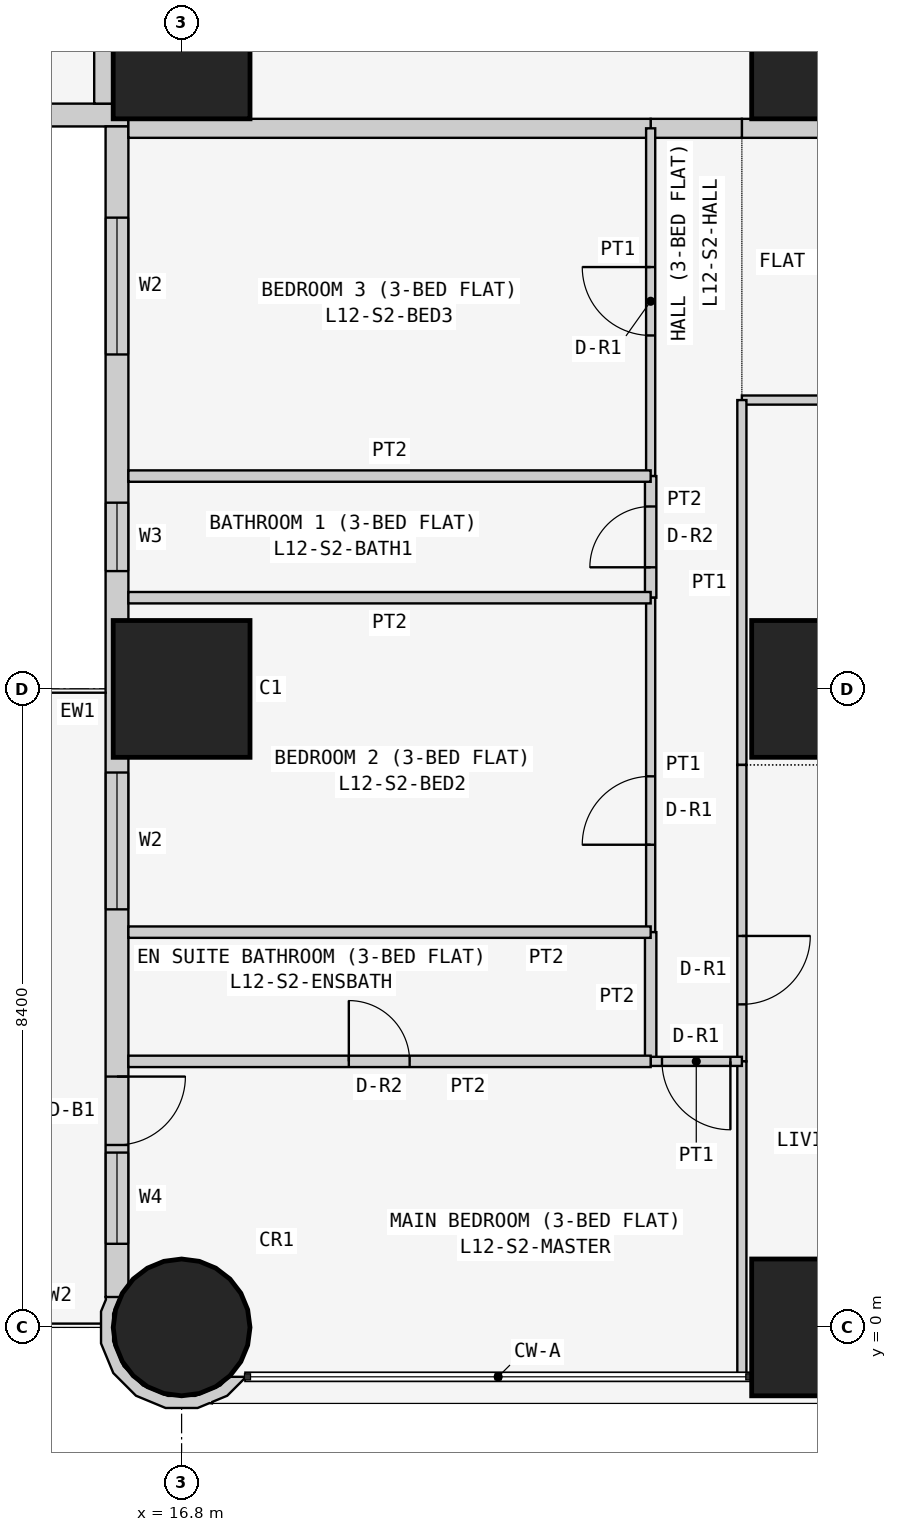
"""IFC4 building model, lengths in metres.
Left out: names, types, materials, properties, quantities, classifications, styles, units other than length and angle.
Written with IfcOpenShell. Run it as: python <this file> out.ifc"""

import sys

from ifc_helpers import new_model, si_unit, direction, frame, frame_2d, origin, origin_2d, place, context, subcontext, project, spatial, polyline, rectangle, circle, outline, extrude, element, fill, save


model = new_model("IFC4")
c1 = context("Model", 3, precision=1e-05, world=origin(), true_north=direction((0.0, 1.0)))
c2 = subcontext(c1, "Body", "Model", "MODEL_VIEW")
j1 = project(units=[si_unit("LENGTHUNIT", "METRE"), si_unit("PLANEANGLEUNIT", "RADIAN")], contexts=[c1])
p1 = place(None, origin())
s1 = spatial("IfcSite", under=j1, at=p1, CompositionType="ELEMENT")
p2 = place(p1, origin())
s2 = spatial("IfcBuilding", under=s1, at=p2, CompositionType="ELEMENT")
p3 = place(p2, frame((0.0, 0.0, 52.5)))
s3 = spatial("IfcBuildingStorey", under=s2, at=p3, CompositionType="ELEMENT", Elevation=52.5)
p4 = place(p3, frame((16.8, 0.0, 0.0), z_axis=(0.0, 0.0, 1.0), x_axis=(1.0, 0.0, 0.0)))
e1 = element("IfcColumn", 1, at=p4, inside=s3, PredefinedType="COLUMN", context=c2, shape_type="SweptSolid", body=[
    extrude(circle(Radius=0.9, at=origin_2d()), origin(), (0.0, 0.0, 1.0), 3.6),
])
for number, where, z_axis, x_axis in (
    (2, (16.8, 8.4, 0.0), (0.0, 0.0, 1.0), (1.0, 0.0, 0.0)),
    (3, (16.8, 16.8, 0.0), (0.0, 0.0, 1.0), (1.0, 0.0, 0.0)),
    (4, (25.2, 0.0, 0.0), (0.0, 0.0, 1.0), (1.0, 0.0, 0.0)),
    (5, (25.2, 8.4, 0.0), (0.0, 0.0, 1.0), (1.0, 0.0, 0.0)),
    (6, (25.2, 16.8, 0.0), (0.0, 0.0, 1.0), (1.0, 0.0, 0.0)),
):
    element("IfcColumn", number, at=place(p3, frame(where, z_axis=z_axis, x_axis=x_axis)), inside=s3, PredefinedType="COLUMN", context=c2, shape_type="SweptSolid", body=[
        extrude(rectangle(XDim=1.8, YDim=1.8, at=origin_2d()), origin(), (0.0, 0.0, 1.0), 3.6),
    ])
p5 = place(p3, frame((0.4, 15.95, 0.0), z_axis=(0.0, 0.0, 1.0), x_axis=(1.0, 0.0, 0.0)))
e7 = element("IfcWall", 7, at=p5, inside=s3, PredefinedType="SOLIDWALL", context=c2, shape_type="SweptSolid", body=[
    extrude(rectangle(XDim=15.7, YDim=0.3, at=frame_2d((7.85, 0.0))), origin(), (0.0, 0.0, 1.0), 3.45),
])
p6 = place(p5, frame((12.4, 0.0, 0.9)))
e8 = element("IfcOpeningElement", 8, at=p6, cuts=e7, PredefinedType="OPENING", context=c2, shape_type="SweptSolid", body=[
    extrude(rectangle(XDim=1.8, YDim=1.5, at=frame_2d((0.9, 0.75))), frame((0.0, 0.16, 0.0), z_axis=(0.0, -1.0, 0.0), x_axis=(1.0, 0.0, 0.0)), (0.0, 0.0, 1.0), 0.32),
])
p7 = place(p5, frame((9.55, 0.0, 1.5)))
e9 = element("IfcOpeningElement", 9, at=p7, cuts=e7, PredefinedType="OPENING", context=c2, shape_type="SweptSolid", body=[
    extrude(rectangle(XDim=0.9, YDim=0.7, at=frame_2d((0.45, 0.35))), frame((0.0, 0.16, 0.0), z_axis=(0.0, -1.0, 0.0), x_axis=(1.0, 0.0, 0.0)), (0.0, 0.0, 1.0), 0.32),
])
p8 = place(p5, frame((5.1, 0.0, 0.9)))
e10 = element("IfcOpeningElement", 10, at=p8, cuts=e7, PredefinedType="OPENING", context=c2, shape_type="SweptSolid", body=[
    extrude(rectangle(XDim=1.8, YDim=1.5, at=frame_2d((0.9, 0.75))), frame((0.0, 0.16, 0.0), z_axis=(0.0, -1.0, 0.0), x_axis=(1.0, 0.0, 0.0)), (0.0, 0.0, 1.0), 0.32),
])
p9 = place(p5, frame((2.0, 0.0, 0.0)))
e11 = element("IfcOpeningElement", 11, at=p9, cuts=e7, PredefinedType="OPENING", context=c2, shape_type="SweptSolid", body=[
    extrude(rectangle(XDim=0.9, YDim=2.4, at=frame_2d((0.45, 1.2))), frame((0.0, 0.16, 0.0), z_axis=(0.0, -1.0, 0.0), x_axis=(1.0, 0.0, 0.0)), (0.0, 0.0, 1.0), 0.32),
])
p10 = place(p5, frame((0.7, 0.0, 0.9)))
e12 = element("IfcOpeningElement", 12, at=p10, cuts=e7, PredefinedType="OPENING", context=c2, shape_type="SweptSolid", body=[
    extrude(rectangle(XDim=1.2, YDim=1.5, at=frame_2d((0.6, 0.75))), frame((0.0, 0.16, 0.0), z_axis=(0.0, -1.0, 0.0), x_axis=(1.0, 0.0, 0.0)), (0.0, 0.0, 1.0), 0.32),
])
p11 = place(p3, frame((15.95, 15.8, 0.0), z_axis=(0.0, 0.0, 1.0), x_axis=(0.0, -1.0, 0.0)))
e13 = element("IfcWall", 13, at=p11, inside=s3, PredefinedType="SOLIDWALL", context=c2, shape_type="SweptSolid", body=[
    extrude(rectangle(XDim=15.4, YDim=0.3, at=frame_2d((7.7, 0.0))), origin(), (0.0, 0.0, 1.0), 3.45),
])
p12 = place(p11, frame((1.2, 0.0, 0.9)))
e14 = element("IfcOpeningElement", 14, at=p12, cuts=e13, PredefinedType="OPENING", context=c2, shape_type="SweptSolid", body=[
    extrude(rectangle(XDim=1.8, YDim=1.5, at=frame_2d((0.9, 0.75))), frame((0.0, 0.16, 0.0), z_axis=(0.0, -1.0, 0.0), x_axis=(1.0, 0.0, 0.0)), (0.0, 0.0, 1.0), 0.32),
])
p13 = place(p11, frame((4.95, 0.0, 1.5)))
e15 = element("IfcOpeningElement", 15, at=p13, cuts=e13, PredefinedType="OPENING", context=c2, shape_type="SweptSolid", body=[
    extrude(rectangle(XDim=0.9, YDim=0.7, at=frame_2d((0.45, 0.35))), frame((0.0, 0.16, 0.0), z_axis=(0.0, -1.0, 0.0), x_axis=(1.0, 0.0, 0.0)), (0.0, 0.0, 1.0), 0.32),
])
p14 = place(p11, frame((8.5, 0.0, 0.9)))
e16 = element("IfcOpeningElement", 16, at=p14, cuts=e13, PredefinedType="OPENING", context=c2, shape_type="SweptSolid", body=[
    extrude(rectangle(XDim=1.8, YDim=1.5, at=frame_2d((0.9, 0.75))), frame((0.0, 0.16, 0.0), z_axis=(0.0, -1.0, 0.0), x_axis=(1.0, 0.0, 0.0)), (0.0, 0.0, 1.0), 0.32),
])
p15 = place(p11, frame((12.5, 0.0, 0.0)))
e17 = element("IfcOpeningElement", 17, at=p15, cuts=e13, PredefinedType="OPENING", context=c2, shape_type="SweptSolid", body=[
    extrude(rectangle(XDim=0.9, YDim=2.4, at=frame_2d((0.45, 1.2))), frame((0.0, 0.16, 0.0), z_axis=(0.0, -1.0, 0.0), x_axis=(1.0, 0.0, 0.0)), (0.0, 0.0, 1.0), 0.32),
])
p16 = place(p11, frame((13.5, 0.0, 0.9)))
e18 = element("IfcOpeningElement", 18, at=p16, cuts=e13, PredefinedType="OPENING", context=c2, shape_type="SweptSolid", body=[
    extrude(rectangle(XDim=1.2, YDim=1.5, at=frame_2d((0.6, 0.75))), frame((0.0, 0.16, 0.0), z_axis=(0.0, -1.0, 0.0), x_axis=(1.0, 0.0, 0.0)), (0.0, 0.0, 1.0), 0.32),
])
p17 = place(p3, frame((15.89, 0.364, 0.0), z_axis=(0.0, 0.0, 1.0), x_axis=(-0.377204953059, -0.926129809145, 0.0)))
e19 = element("IfcWall", 19, at=p17, inside=s3, PredefinedType="SOLIDWALL", context=c2, shape_type="SweptSolid", body=[
    extrude(outline(polyline([(0.36, 1.803), (0.509, 1.741), (0.761, 1.486), (0.896, 1.154), (0.894, 0.795), (0.755, 0.465), (0.5, 0.213), (0.168, 0.078), (-0.1, 0.08), (0.001, -0.097), (0.03, -0.08), (0.199, -0.081), (0.589, 0.078), (0.889, 0.374), (1.053, 0.763), (1.055, 1.185), (0.896, 1.575), (0.778, 1.695), (0.769, 1.728), (0.75, 1.723), (0.6, 1.875), (0.295, 2.004), (0.281, 1.998), (0.36, 1.803)])), origin(), (0.0, 0.0, 1.0), 3.45),
])
p18 = place(p3, frame((29.4, 15.775, 0.0), z_axis=(0.0, 0.0, 1.0), x_axis=(-1.0, 0.0, 0.0)))
e20 = element("IfcWall", 20, at=p18, inside=s3, PredefinedType="PARTITIONING", context=c2, shape_type="SweptSolid", body=[
    extrude(rectangle(XDim=5.229, YDim=0.25, at=frame_2d((2.615, 0.0))), origin(), (0.0, 0.0, 1.0), 3.45),
])
p19 = place(p18, frame((2.1, 0.0, 0.0)))
e21 = element("IfcOpeningElement", 21, at=p19, cuts=e20, PredefinedType="OPENING", context=c2, shape_type="SweptSolid", body=[
    extrude(rectangle(XDim=1.0, YDim=2.1, at=frame_2d((0.5, 1.05))), frame((0.0, 0.135, 0.0), z_axis=(0.0, -1.0, 0.0), x_axis=(1.0, 0.0, 0.0)), (0.0, 0.0, 1.0), 0.27),
])
p20 = place(p3, frame((24.171, 15.775, 0.0), z_axis=(0.0, 0.0, 1.0), x_axis=(-1.0, 0.0, 0.0)))
e22 = element("IfcWall", 22, at=p20, inside=s3, PredefinedType="PARTITIONING", context=c2, shape_type="SweptSolid", body=[
    extrude(rectangle(XDim=1.2, YDim=0.25, at=frame_2d((0.6, 0.0))), origin(), (0.0, 0.0, 1.0), 3.45),
])
for number, where, z_axis, x_axis in (
    (23, (22.971, 15.775, 0.0), (0.0, 0.0, 1.0), (-1.0, 0.0, 0.0)),
    (24, (15.775, 16.1, 0.0), (0.0, 0.0, 1.0), (0.0, 1.0, 0.0)),
):
    element("IfcWall", number, at=place(p3, frame(where, z_axis=z_axis, x_axis=x_axis)), inside=s3, PredefinedType="PARTITIONING", context=c2, shape_type="SweptSolid", body=[
        extrude(rectangle(XDim=6.871, YDim=0.25, at=frame_2d((3.436, 0.0))), origin(), (0.0, 0.0, 1.0), 3.45),
    ])
p21 = place(p3, frame((29.4, 12.2, 0.0), z_axis=(0.0, 0.0, 1.0), x_axis=(-1.0, 0.0, 0.0)))
e25 = element("IfcWall", 25, at=p21, inside=s3, PredefinedType="PARTITIONING", context=c2, shape_type="SweptSolid", body=[
    extrude(rectangle(XDim=5.229, YDim=0.12, at=frame_2d((2.615, 0.0))), origin(), (0.0, 0.0, 1.0), 3.45),
])
p22 = place(p21, frame((1.05, 0.0, 0.0)))
e26 = element("IfcOpeningElement", 26, at=p22, cuts=e25, PredefinedType="OPENING", context=c2, shape_type="SweptSolid", body=[
    extrude(rectangle(XDim=0.9, YDim=2.1, at=frame_2d((0.45, 1.05))), frame((0.0, 0.07, 0.0), z_axis=(0.0, -1.0, 0.0), x_axis=(1.0, 0.0, 0.0)), (0.0, 0.0, 1.0), 0.14),
])
p23 = place(p3, frame((24.171, 7.4, 0.0), z_axis=(0.0, 0.0, 1.0), x_axis=(0.0, 1.0, 0.0)))
e27 = element("IfcWall", 27, at=p23, inside=s3, PredefinedType="PARTITIONING", context=c2, shape_type="SweptSolid", body=[
    extrude(rectangle(XDim=4.8, YDim=0.12, at=frame_2d((2.4, 0.0))), origin(), (0.0, 0.0, 1.0), 3.45),
])
p24 = place(p3, frame((24.171, 3.5, 0.0), z_axis=(0.0, 0.0, 1.0), x_axis=(0.0, 1.0, 0.0)))
e28 = element("IfcWall", 28, at=p24, inside=s3, PredefinedType="PARTITIONING", context=c2, shape_type="SweptSolid", body=[
    extrude(rectangle(XDim=3.9, YDim=0.12, at=frame_2d((1.95, 0.0))), origin(), (0.0, 0.0, 1.0), 3.45),
])
p25 = place(p24, frame((0.75, 0.0, 0.0)))
e29 = element("IfcOpeningElement", 29, at=p25, cuts=e28, PredefinedType="OPENING", context=c2, shape_type="SweptSolid", body=[
    extrude(rectangle(XDim=0.9, YDim=2.1, at=frame_2d((0.45, 1.05))), frame((0.0, 0.07, 0.0), z_axis=(0.0, -1.0, 0.0), x_axis=(1.0, 0.0, 0.0)), (0.0, 0.0, 1.0), 0.14),
])
p26 = place(p3, frame((24.171, -0.65, 0.0), z_axis=(0.0, 0.0, 1.0), x_axis=(0.0, 1.0, 0.0)))
e30 = element("IfcWall", 30, at=p26, inside=s3, PredefinedType="PARTITIONING", context=c2, shape_type="SweptSolid", body=[
    extrude(rectangle(XDim=4.15, YDim=0.12, at=frame_2d((2.075, 0.0))), origin(), (0.0, 0.0, 1.0), 3.45),
])
p27 = place(p3, frame((22.971, 11.2, 0.0), z_axis=(0.0, 0.0, 1.0), x_axis=(0.0, 1.0, 0.0)))
e31 = element("IfcWall", 31, at=p27, inside=s3, PredefinedType="PARTITIONING", context=c2, shape_type="SweptSolid", body=[
    extrude(rectangle(XDim=4.575, YDim=0.12, at=frame_2d((2.288, 0.0))), origin(), (0.0, 0.0, 1.0), 3.45),
])
p28 = place(p27, frame((1.85, 0.0, 0.0)))
e32 = element("IfcOpeningElement", 32, at=p28, cuts=e31, PredefinedType="OPENING", context=c2, shape_type="SweptSolid", body=[
    extrude(rectangle(XDim=0.9, YDim=2.1, at=frame_2d((0.45, 1.05))), frame((0.0, 0.07, 0.0), z_axis=(0.0, -1.0, 0.0), x_axis=(1.0, 0.0, 0.0)), (0.0, 0.0, 1.0), 0.14),
])
p29 = place(p3, frame((22.971, 9.6, 0.0), z_axis=(0.0, 0.0, 1.0), x_axis=(0.0, 1.0, 0.0)))
e33 = element("IfcWall", 33, at=p29, inside=s3, PredefinedType="PARTITIONING", context=c2, shape_type="SweptSolid", body=[
    extrude(rectangle(XDim=1.6, YDim=0.15, at=frame_2d((0.8, 0.0))), origin(), (0.0, 0.0, 1.0), 3.45),
])
p30 = place(p29, frame((0.4, 0.0, 0.0)))
e34 = element("IfcOpeningElement", 34, at=p30, cuts=e33, PredefinedType="OPENING", context=c2, shape_type="SweptSolid", body=[
    extrude(rectangle(XDim=0.8, YDim=2.1, at=frame_2d((0.4, 1.05))), frame((0.0, 0.085, 0.0), z_axis=(0.0, -1.0, 0.0), x_axis=(1.0, 0.0, 0.0)), (0.0, 0.0, 1.0), 0.17),
])
p31 = place(p3, frame((22.971, 5.2, 0.0), z_axis=(0.0, 0.0, 1.0), x_axis=(0.0, 1.0, 0.0)))
e35 = element("IfcWall", 35, at=p31, inside=s3, PredefinedType="PARTITIONING", context=c2, shape_type="SweptSolid", body=[
    extrude(rectangle(XDim=4.4, YDim=0.12, at=frame_2d((2.2, 0.0))), origin(), (0.0, 0.0, 1.0), 3.45),
])
p32 = place(p31, frame((1.15, 0.0, 0.0)))
e36 = element("IfcOpeningElement", 36, at=p32, cuts=e35, PredefinedType="OPENING", context=c2, shape_type="SweptSolid", body=[
    extrude(rectangle(XDim=0.9, YDim=2.1, at=frame_2d((0.45, 1.05))), frame((0.0, 0.07, 0.0), z_axis=(0.0, -1.0, 0.0), x_axis=(1.0, 0.0, 0.0)), (0.0, 0.0, 1.0), 0.14),
])
p33 = place(p3, frame((22.971, 3.5, 0.0), z_axis=(0.0, 0.0, 1.0), x_axis=(0.0, 1.0, 0.0)))
e37 = element("IfcWall", 37, at=p33, inside=s3, PredefinedType="PARTITIONING", context=c2, shape_type="SweptSolid", body=[
    extrude(rectangle(XDim=1.7, YDim=0.15, at=frame_2d((0.85, 0.0))), origin(), (0.0, 0.0, 1.0), 3.45),
])
p34 = place(p3, frame((24.171, 3.5, 0.0), z_axis=(0.0, 0.0, 1.0), x_axis=(-1.0, 0.0, 0.0)))
e38 = element("IfcWall", 38, at=p34, inside=s3, PredefinedType="PARTITIONING", context=c2, shape_type="SweptSolid", body=[
    extrude(rectangle(XDim=1.2, YDim=0.12, at=frame_2d((0.6, 0.0))), origin(), (0.0, 0.0, 1.0), 3.45),
])
p35 = place(p34, frame((0.151, 0.0, 0.0)))
e39 = element("IfcOpeningElement", 39, at=p35, cuts=e38, PredefinedType="OPENING", context=c2, shape_type="SweptSolid", body=[
    extrude(rectangle(XDim=0.9, YDim=2.1, at=frame_2d((0.45, 1.05))), frame((0.0, 0.07, 0.0), z_axis=(0.0, -1.0, 0.0), x_axis=(1.0, 0.0, 0.0)), (0.0, 0.0, 1.0), 0.14),
])
for number, where, z_axis, x_axis in (
    (40, (22.971, 11.2, 0.0), (0.0, 0.0, 1.0), (-1.0, 0.0, 0.0)),
    (41, (22.971, 9.6, 0.0), (0.0, 0.0, 1.0), (-1.0, 0.0, 0.0)),
    (42, (22.971, 5.2, 0.0), (0.0, 0.0, 1.0), (-1.0, 0.0, 0.0)),
):
    element("IfcWall", number, at=place(p3, frame(where, z_axis=z_axis, x_axis=x_axis)), inside=s3, PredefinedType="PARTITIONING", context=c2, shape_type="SweptSolid", body=[
        extrude(rectangle(XDim=6.871, YDim=0.15, at=frame_2d((3.436, 0.0))), origin(), (0.0, 0.0, 1.0), 3.45),
    ])
p36 = place(p3, frame((22.971, 3.5, 0.0), z_axis=(0.0, 0.0, 1.0), x_axis=(-1.0, 0.0, 0.0)))
e43 = element("IfcWall", 43, at=p36, inside=s3, PredefinedType="PARTITIONING", context=c2, shape_type="SweptSolid", body=[
    extrude(rectangle(XDim=6.871, YDim=0.15, at=frame_2d((3.436, 0.0))), origin(), (0.0, 0.0, 1.0), 3.45),
])
p37 = place(p36, frame((3.171, 0.0, 0.0)))
e44 = element("IfcOpeningElement", 44, at=p37, cuts=e43, PredefinedType="OPENING", context=c2, shape_type="SweptSolid", body=[
    extrude(rectangle(XDim=0.8, YDim=2.1, at=frame_2d((0.4, 1.05))), frame((0.0, 0.085, 0.0), z_axis=(0.0, -1.0, 0.0), x_axis=(1.0, 0.0, 0.0)), (0.0, 0.0, 1.0), 0.17),
])
p38 = place(p12, origin())
e45 = element("IfcWindow", 45, at=p38, inside=s3, PartitioningType="SINGLE_PANEL", PredefinedType="WINDOW", context=c2, shape_type="SweptSolid", body=[
    extrude(rectangle(XDim=1.8, YDim=1.5, at=frame_2d((0.9, 0.75))), frame((0.0, 0.03, 0.0), z_axis=(0.0, -1.0, 0.0), x_axis=(1.0, 0.0, 0.0)), (0.0, 0.0, 1.0), 0.06),
])
fill(e14, e45)
p39 = place(p13, origin())
e46 = element("IfcWindow", 46, at=p39, inside=s3, PartitioningType="SINGLE_PANEL", PredefinedType="WINDOW", context=c2, shape_type="SweptSolid", body=[
    extrude(rectangle(XDim=0.9, YDim=0.7, at=frame_2d((0.45, 0.35))), frame((0.0, 0.03, 0.0), z_axis=(0.0, -1.0, 0.0), x_axis=(1.0, 0.0, 0.0)), (0.0, 0.0, 1.0), 0.06),
])
fill(e15, e46)
p40 = place(p14, origin())
e47 = element("IfcWindow", 47, at=p40, inside=s3, PartitioningType="SINGLE_PANEL", PredefinedType="WINDOW", context=c2, shape_type="SweptSolid", body=[
    extrude(rectangle(XDim=1.8, YDim=1.5, at=frame_2d((0.9, 0.75))), frame((0.0, 0.03, 0.0), z_axis=(0.0, -1.0, 0.0), x_axis=(1.0, 0.0, 0.0)), (0.0, 0.0, 1.0), 0.06),
])
fill(e16, e47)
p41 = place(p15, origin())
e48 = element("IfcDoor", 48, at=p41, inside=s3, OperationType="SINGLE_SWING_LEFT", PredefinedType="DOOR", context=c2, shape_type="SweptSolid", body=[
    extrude(rectangle(XDim=0.9, YDim=2.4, at=frame_2d((0.45, 1.2))), frame((0.0, 0.025, 0.0), z_axis=(0.0, -1.0, 0.0), x_axis=(1.0, 0.0, 0.0)), (0.0, 0.0, 1.0), 0.05),
])
fill(e17, e48)
p42 = place(p16, origin())
e49 = element("IfcWindow", 49, at=p42, inside=s3, PartitioningType="SINGLE_PANEL", PredefinedType="WINDOW", context=c2, shape_type="SweptSolid", body=[
    extrude(rectangle(XDim=1.2, YDim=1.5, at=frame_2d((0.6, 0.75))), frame((0.0, 0.03, 0.0), z_axis=(0.0, -1.0, 0.0), x_axis=(1.0, 0.0, 0.0)), (0.0, 0.0, 1.0), 0.06),
])
fill(e18, e49)
p43 = place(p25, frame((0.9, 0.0, 0.0), z_axis=(0.0, 0.0, 1.0), x_axis=(-1.0, 0.0, 0.0)))
e50 = element("IfcDoor", 50, at=p43, inside=s3, OperationType="SINGLE_SWING_LEFT", PredefinedType="DOOR", context=c2, shape_type="SweptSolid", body=[
    extrude(rectangle(XDim=0.9, YDim=2.1, at=frame_2d((0.45, 1.05))), frame((0.0, 0.025, 0.0), z_axis=(0.0, -1.0, 0.0), x_axis=(1.0, 0.0, 0.0)), (0.0, 0.0, 1.0), 0.05),
])
fill(e29, e50)
p44 = place(p28, origin())
e51 = element("IfcDoor", 51, at=p44, inside=s3, OperationType="SINGLE_SWING_RIGHT", PredefinedType="DOOR", context=c2, shape_type="SweptSolid", body=[
    extrude(rectangle(XDim=0.9, YDim=2.1, at=frame_2d((0.45, 1.05))), frame((0.0, 0.025, 0.0), z_axis=(0.0, -1.0, 0.0), x_axis=(1.0, 0.0, 0.0)), (0.0, 0.0, 1.0), 0.05),
])
fill(e32, e51)
p45 = place(p30, origin())
e52 = element("IfcDoor", 52, at=p45, inside=s3, OperationType="SINGLE_SWING_LEFT", PredefinedType="DOOR", context=c2, shape_type="SweptSolid", body=[
    extrude(rectangle(XDim=0.8, YDim=2.1, at=frame_2d((0.4, 1.05))), frame((0.0, 0.025, 0.0), z_axis=(0.0, -1.0, 0.0), x_axis=(1.0, 0.0, 0.0)), (0.0, 0.0, 1.0), 0.05),
])
fill(e34, e52)
p46 = place(p32, origin())
e53 = element("IfcDoor", 53, at=p46, inside=s3, OperationType="SINGLE_SWING_LEFT", PredefinedType="DOOR", context=c2, shape_type="SweptSolid", body=[
    extrude(rectangle(XDim=0.9, YDim=2.1, at=frame_2d((0.45, 1.05))), frame((0.0, 0.025, 0.0), z_axis=(0.0, -1.0, 0.0), x_axis=(1.0, 0.0, 0.0)), (0.0, 0.0, 1.0), 0.05),
])
fill(e36, e53)
p47 = place(p35, origin())
e54 = element("IfcDoor", 54, at=p47, inside=s3, OperationType="SINGLE_SWING_LEFT", PredefinedType="DOOR", context=c2, shape_type="SweptSolid", body=[
    extrude(rectangle(XDim=0.9, YDim=2.1, at=frame_2d((0.45, 1.05))), frame((0.0, 0.025, 0.0), z_axis=(0.0, -1.0, 0.0), x_axis=(1.0, 0.0, 0.0)), (0.0, 0.0, 1.0), 0.05),
])
fill(e39, e54)
p48 = place(p37, frame((0.8, 0.0, 0.0), z_axis=(0.0, 0.0, 1.0), x_axis=(-1.0, 0.0, 0.0)))
e55 = element("IfcDoor", 55, at=p48, inside=s3, OperationType="SINGLE_SWING_LEFT", PredefinedType="DOOR", context=c2, shape_type="SweptSolid", body=[
    extrude(rectangle(XDim=0.8, YDim=2.1, at=frame_2d((0.4, 1.05))), frame((0.0, 0.025, 0.0), z_axis=(0.0, -1.0, 0.0), x_axis=(1.0, 0.0, 0.0)), (0.0, 0.0, 1.0), 0.05),
])
fill(e44, e55)
save(model, sys.argv[1])
